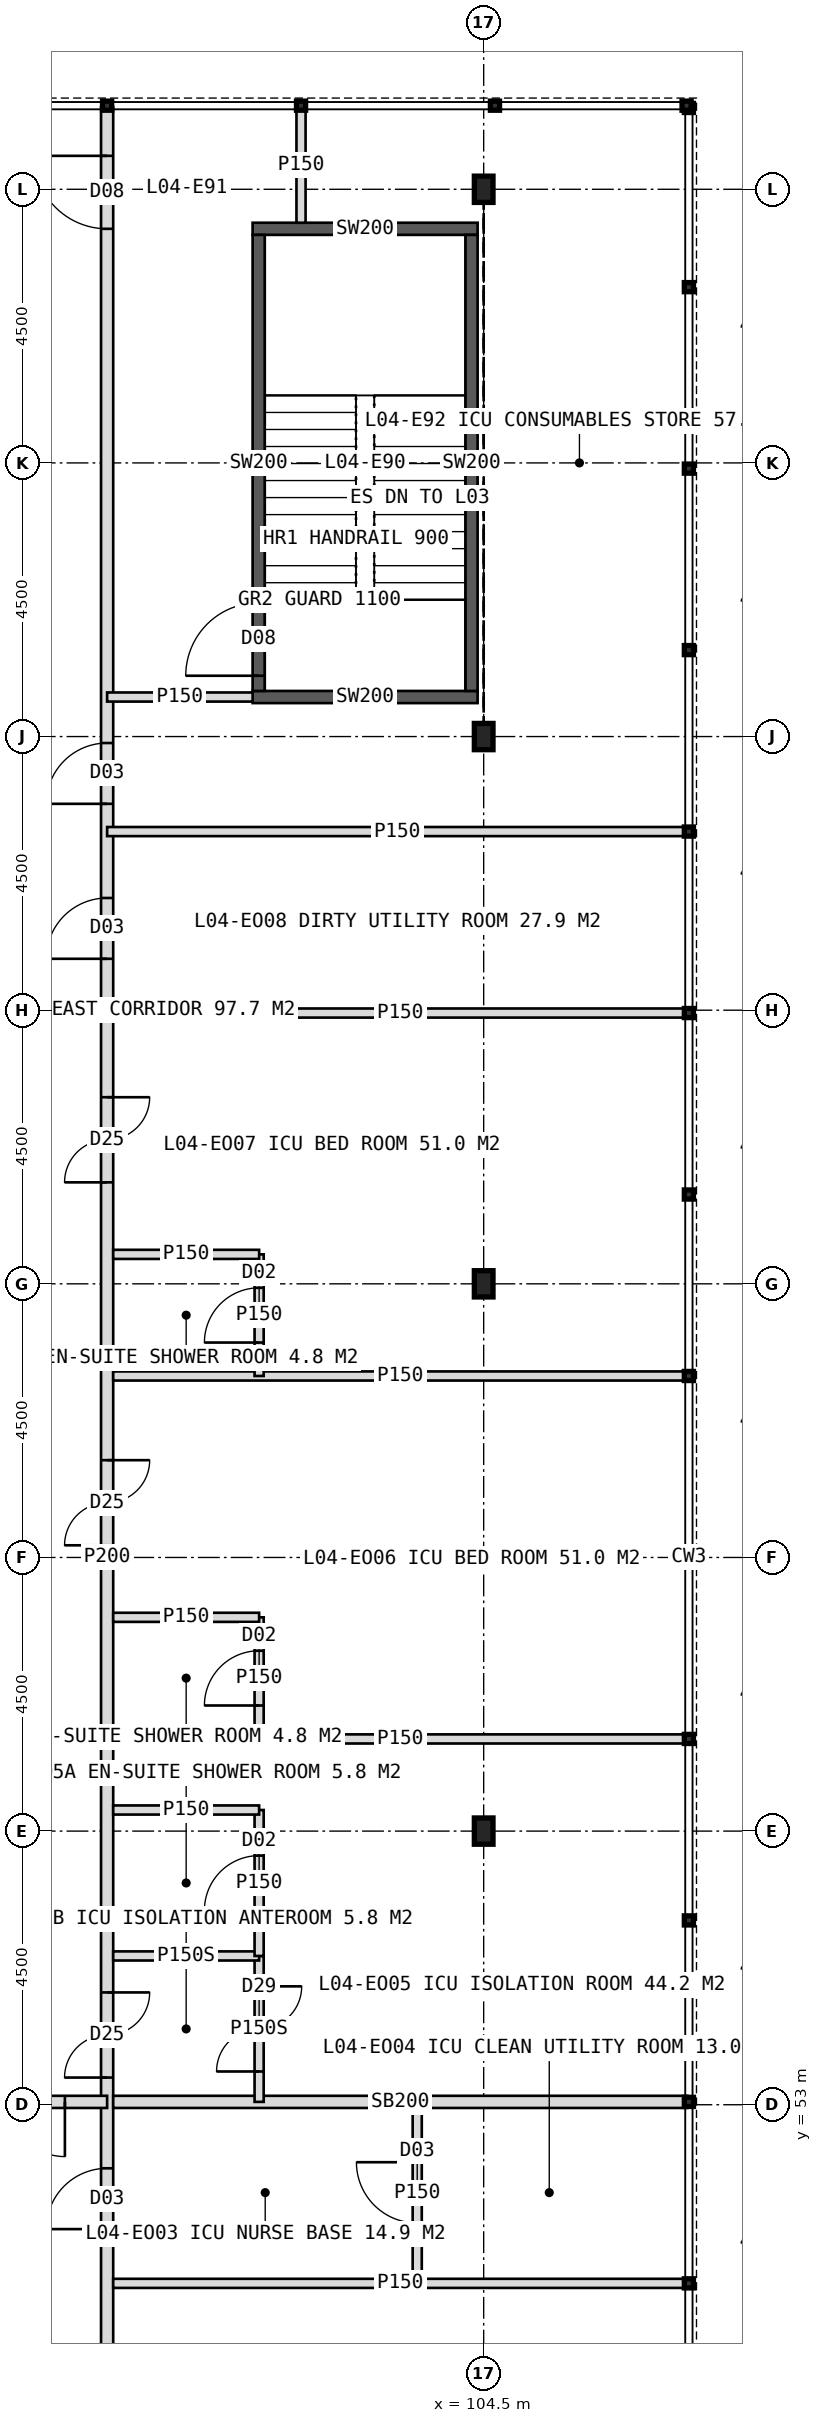
"""IFC4 building model, lengths in metres.
Left out: names, types, materials, properties, quantities, classifications, styles, units other than length and angle.
Written with IfcOpenShell. Run it as: python <this file> out.ifc"""

import sys

from ifc_helpers import new_model, si_unit, direction, frame, frame_2d, origin, origin_2d, place, context, subcontext, project, spatial, rectangle, i_section, extrude, element, fill, save


model = new_model("IFC4")
c1 = context("Model", 3, precision=1e-05, world=origin(), true_north=direction((0.0, 1.0)))
c2 = subcontext(c1, "Body", "Model", "MODEL_VIEW")
j1 = project(units=[si_unit("LENGTHUNIT", "METRE"), si_unit("PLANEANGLEUNIT", "RADIAN")], contexts=[c1])
p1 = place(None, origin())
s1 = spatial("IfcSite", under=j1, at=p1, CompositionType="ELEMENT")
p2 = place(p1, origin())
s2 = spatial("IfcBuilding", under=s1, at=p2, CompositionType="ELEMENT")
p3 = place(p2, frame((0.0, 0.0, 21.0)))
s3 = spatial("IfcBuildingStorey", under=s2, at=p3, CompositionType="ELEMENT", Elevation=21.0)
for number, where, z_axis, x_axis in (
    (1, (104.5, 57.5, 0.0), (0.0, 0.0, 1.0), (1.0, 0.0, 0.0)),
    (2, (104.5, 66.5, 0.0), (0.0, 0.0, 1.0), (1.0, 0.0, 0.0)),
    (3, (104.5, 75.5, 0.0), (0.0, 0.0, 1.0), (1.0, 0.0, 0.0)),
    (4, (104.5, 84.5, 0.0), (0.0, 0.0, 1.0), (1.0, 0.0, 0.0)),
):
    element("IfcColumn", number, at=place(p3, frame(where, z_axis=z_axis, x_axis=x_axis)), inside=s3, PredefinedType="COLUMN", context=c2, shape_type="SweptSolid", body=[
        extrude(i_section(OverallWidth=0.307, OverallDepth=0.432, WebThickness=0.021, FlangeThickness=0.04, FilletRadius=0.027, at=origin_2d()), origin(), (0.0, 0.0, 1.0), 5.0),
    ])
p4 = place(p3, frame((98.307, 38.15, 0.0), z_axis=(0.0, 0.0, 1.0), x_axis=(0.0, 1.0, 0.0)))
e5 = element("IfcWall", 5, at=p4, inside=s3, PredefinedType="PARTITIONING", context=c2, shape_type="SweptSolid", body=[
    extrude(rectangle(XDim=47.7, YDim=0.2, at=frame_2d((23.85, 0.0))), origin(), (0.0, 0.0, 1.0), 4.7),
])
p5 = place(p4, frame((45.7, 0.0, 0.0)))
e6 = element("IfcOpeningElement", 6, at=p5, cuts=e5, PredefinedType="OPENING", context=c2, shape_type="SweptSolid", body=[
    extrude(rectangle(XDim=1.2, YDim=2.1, at=frame_2d((0.6, 1.05))), frame((0.0, 0.11, 0.0), z_axis=(0.0, -1.0, 0.0), x_axis=(1.0, 0.0, 0.0)), (0.0, 0.0, 1.0), 0.22),
])
p6 = place(p4, frame((36.244, 0.0, 0.0)))
e7 = element("IfcOpeningElement", 7, at=p6, cuts=e5, PredefinedType="OPENING", context=c2, shape_type="SweptSolid", body=[
    extrude(rectangle(XDim=1.0, YDim=2.1, at=frame_2d((0.5, 1.05))), frame((0.0, 0.11, 0.0), z_axis=(0.0, -1.0, 0.0), x_axis=(1.0, 0.0, 0.0)), (0.0, 0.0, 1.0), 0.22),
])
p7 = place(p4, frame((15.297, 0.0, 0.0)))
e8 = element("IfcOpeningElement", 8, at=p7, cuts=e5, PredefinedType="OPENING", context=c2, shape_type="SweptSolid", body=[
    extrude(rectangle(XDim=1.4, YDim=2.2, at=frame_2d((0.7, 1.1))), frame((0.0, 0.11, 0.0), z_axis=(0.0, -1.0, 0.0), x_axis=(1.0, 0.0, 0.0)), (0.0, 0.0, 1.0), 0.22),
])
p8 = place(p4, frame((3.222, 0.0, 0.0)))
e9 = element("IfcOpeningElement", 9, at=p8, cuts=e5, PredefinedType="OPENING", context=c2, shape_type="SweptSolid", body=[
    extrude(rectangle(XDim=1.4, YDim=2.2, at=frame_2d((0.7, 1.1))), frame((0.0, 0.11, 0.0), z_axis=(0.0, -1.0, 0.0), x_axis=(1.0, 0.0, 0.0)), (0.0, 0.0, 1.0), 0.22),
])
p9 = place(p4, frame((9.128, 0.0, 0.0)))
e10 = element("IfcOpeningElement", 10, at=p9, cuts=e5, PredefinedType="OPENING", context=c2, shape_type="SweptSolid", body=[
    extrude(rectangle(XDim=1.4, YDim=2.2, at=frame_2d((0.7, 1.1))), frame((0.0, 0.11, 0.0), z_axis=(0.0, -1.0, 0.0), x_axis=(1.0, 0.0, 0.0)), (0.0, 0.0, 1.0), 0.22),
])
p10 = place(p4, frame((12.805, 0.0, 0.0)))
e11 = element("IfcOpeningElement", 11, at=p10, cuts=e5, PredefinedType="OPENING", context=c2, shape_type="SweptSolid", body=[
    extrude(rectangle(XDim=1.0, YDim=2.1, at=frame_2d((0.5, 1.05))), frame((0.0, 0.11, 0.0), z_axis=(0.0, -1.0, 0.0), x_axis=(1.0, 0.0, 0.0)), (0.0, 0.0, 1.0), 0.22),
])
p11 = place(p4, frame((24.05, 0.0, 0.0)))
e12 = element("IfcOpeningElement", 12, at=p11, cuts=e5, PredefinedType="OPENING", context=c2, shape_type="SweptSolid", body=[
    extrude(rectangle(XDim=1.4, YDim=2.2, at=frame_2d((0.7, 1.1))), frame((0.0, 0.11, 0.0), z_axis=(0.0, -1.0, 0.0), x_axis=(1.0, 0.0, 0.0)), (0.0, 0.0, 1.0), 0.22),
])
p12 = place(p4, frame((30.019, 0.0, 0.0)))
e13 = element("IfcOpeningElement", 13, at=p12, cuts=e5, PredefinedType="OPENING", context=c2, shape_type="SweptSolid", body=[
    extrude(rectangle(XDim=1.4, YDim=2.2, at=frame_2d((0.7, 1.1))), frame((0.0, 0.11, 0.0), z_axis=(0.0, -1.0, 0.0), x_axis=(1.0, 0.0, 0.0)), (0.0, 0.0, 1.0), 0.22),
])
p13 = place(p4, frame((33.695, 0.0, 0.0)))
e14 = element("IfcOpeningElement", 14, at=p13, cuts=e5, PredefinedType="OPENING", context=c2, shape_type="SweptSolid", body=[
    extrude(rectangle(XDim=1.0, YDim=2.1, at=frame_2d((0.5, 1.05))), frame((0.0, 0.11, 0.0), z_axis=(0.0, -1.0, 0.0), x_axis=(1.0, 0.0, 0.0)), (0.0, 0.0, 1.0), 0.22),
])
p14 = place(p3, frame((98.307, 53.047, 0.0), z_axis=(0.0, 0.0, 1.0), x_axis=(-1.0, 0.0, 0.0)))
e15 = element("IfcWall", 15, at=p14, inside=s3, PredefinedType="SOLIDWALL", context=c2, shape_type="SweptSolid", body=[
    extrude(rectangle(XDim=3.189, YDim=0.2, at=frame_2d((1.594, 0.0))), origin(), (0.0, 0.0, 1.0), 4.7),
])
p15 = place(p14, frame((0.695, 0.0, 0.0)))
e16 = element("IfcOpeningElement", 16, at=p15, cuts=e15, PredefinedType="OPENING", context=c2, shape_type="SweptSolid", body=[
    extrude(rectangle(XDim=1.8, YDim=2.2, at=frame_2d((0.9, 1.1))), frame((0.0, 0.11, 0.0), z_axis=(0.0, -1.0, 0.0), x_axis=(1.0, 0.0, 0.0)), (0.0, 0.0, 1.0), 0.22),
])
for number, where, z_axis, x_axis in (
    (17, (100.7, 76.15, 0.0), (0.0, 0.0, 1.0), (1.0, 0.0, 0.0)),
    (18, (100.7, 83.85, 0.0), (0.0, 0.0, 1.0), (1.0, 0.0, 0.0)),
):
    element("IfcWall", number, at=place(p3, frame(where, z_axis=z_axis, x_axis=x_axis)), inside=s3, PredefinedType="SOLIDWALL", context=c2, shape_type="SweptSolid", body=[
        extrude(rectangle(XDim=3.7, YDim=0.2, at=frame_2d((1.85, 0.0))), origin(), (0.0, 0.0, 1.0), 4.7),
    ])
p16 = place(p3, frame((100.8, 76.25, 0.0), z_axis=(0.0, 0.0, 1.0), x_axis=(0.0, 1.0, 0.0)))
e19 = element("IfcWall", 19, at=p16, inside=s3, PredefinedType="SOLIDWALL", context=c2, shape_type="SweptSolid", body=[
    extrude(rectangle(XDim=7.5, YDim=0.2, at=frame_2d((3.75, 0.0))), origin(), (0.0, 0.0, 1.0), 4.7),
])
p17 = place(p16, frame((0.25, 0.0, 0.0)))
e20 = element("IfcOpeningElement", 20, at=p17, cuts=e19, PredefinedType="OPENING", context=c2, shape_type="SweptSolid", body=[
    extrude(rectangle(XDim=1.2, YDim=2.1, at=frame_2d((0.6, 1.05))), frame((0.0, 0.11, 0.0), z_axis=(0.0, -1.0, 0.0), x_axis=(1.0, 0.0, 0.0)), (0.0, 0.0, 1.0), 0.22),
])
p18 = place(p3, frame((104.3, 76.25, 0.0), z_axis=(0.0, 0.0, 1.0), x_axis=(0.0, 1.0, 0.0)))
e21 = element("IfcWall", 21, at=p18, inside=s3, PredefinedType="SOLIDWALL", context=c2, shape_type="SweptSolid", body=[
    extrude(rectangle(XDim=7.5, YDim=0.2, at=frame_2d((3.75, 0.0))), origin(), (0.0, 0.0, 1.0), 4.7),
])
p19 = place(p3, frame((100.7, 76.15, 0.0), z_axis=(0.0, 0.0, 1.0), x_axis=(-1.0, 0.0, 0.0)))
e22 = element("IfcWall", 22, at=p19, inside=s3, PredefinedType="PARTITIONING", context=c2, shape_type="SweptSolid", body=[
    extrude(rectangle(XDim=2.393, YDim=0.15, at=frame_2d((1.197, 0.0))), origin(), (0.0, 0.0, 1.0), 4.7),
])
p20 = place(p3, frame((101.496, 83.95, 0.0), z_axis=(0.0, 0.0, 1.0), x_axis=(0.0, 1.0, 0.0)))
e23 = element("IfcWall", 23, at=p20, inside=s3, PredefinedType="PARTITIONING", context=c2, shape_type="SweptSolid", body=[
    extrude(rectangle(XDim=1.9, YDim=0.15, at=frame_2d((0.95, 0.0))), origin(), (0.0, 0.0, 1.0), 4.7),
])
p21 = place(p3, frame((107.85, 73.938, 0.0), z_axis=(0.0, 0.0, 1.0), x_axis=(-1.0, 0.0, 0.0)))
e24 = element("IfcWall", 24, at=p21, inside=s3, PredefinedType="PARTITIONING", context=c2, shape_type="SweptSolid", body=[
    extrude(rectangle(XDim=9.543, YDim=0.15, at=frame_2d((4.771, 0.0))), origin(), (0.0, 0.0, 1.0), 4.7),
])
p22 = place(p3, frame((107.85, 50.062, 0.0), z_axis=(0.0, 0.0, 1.0), x_axis=(-1.0, 0.0, 0.0)))
e25 = element("IfcWall", 25, at=p22, inside=s3, PredefinedType="PARTITIONING", context=c2, shape_type="SweptSolid", body=[
    extrude(rectangle(XDim=9.443, YDim=0.15, at=frame_2d((4.722, 0.0))), origin(), (0.0, 0.0, 1.0), 4.7),
])
p23 = place(p3, frame((107.85, 53.047, 0.0), z_axis=(0.0, 0.0, 1.0), x_axis=(-1.0, 0.0, 0.0)))
e26 = element("IfcWall", 26, at=p23, inside=s3, PredefinedType="SOLIDWALL", context=c2, shape_type="SweptSolid", body=[
    extrude(rectangle(XDim=9.443, YDim=0.2, at=frame_2d((4.722, 0.0))), origin(), (0.0, 0.0, 1.0), 4.7),
])
for number, where, z_axis, x_axis in (
    (27, (107.85, 59.016, 0.0), (0.0, 0.0, 1.0), (-1.0, 0.0, 0.0)),
    (28, (107.85, 64.984, 0.0), (0.0, 0.0, 1.0), (-1.0, 0.0, 0.0)),
    (29, (107.85, 70.953, 0.0), (0.0, 0.0, 1.0), (-1.0, 0.0, 0.0)),
):
    element("IfcWall", number, at=place(p3, frame(where, z_axis=z_axis, x_axis=x_axis)), inside=s3, PredefinedType="PARTITIONING", context=c2, shape_type="SweptSolid", body=[
        extrude(rectangle(XDim=9.443, YDim=0.15, at=frame_2d((4.722, 0.0))), origin(), (0.0, 0.0, 1.0), 4.7),
    ])
p24 = place(p3, frame((103.407, 50.062, 0.0), z_axis=(0.0, 0.0, 1.0), x_axis=(0.0, 1.0, 0.0)))
e30 = element("IfcWall", 30, at=p24, inside=s3, PredefinedType="PARTITIONING", context=c2, shape_type="SweptSolid", body=[
    extrude(rectangle(XDim=2.984, YDim=0.15, at=frame_2d((1.492, 0.0))), origin(), (0.0, 0.0, 1.0), 4.7),
])
p25 = place(p24, frame((0.992, 0.0, 0.0)))
e31 = element("IfcOpeningElement", 31, at=p25, cuts=e30, PredefinedType="OPENING", context=c2, shape_type="SweptSolid", body=[
    extrude(rectangle(XDim=1.0, YDim=2.1, at=frame_2d((0.5, 1.05))), frame((0.0, 0.085, 0.0), z_axis=(0.0, -1.0, 0.0), x_axis=(1.0, 0.0, 0.0)), (0.0, 0.0, 1.0), 0.17),
])
p26 = place(p3, frame((100.807, 53.047, 0.0), z_axis=(0.0, 0.0, 1.0), x_axis=(0.0, 1.0, 0.0)))
e32 = element("IfcWall", 32, at=p26, inside=s3, PredefinedType="PARTITIONING", context=c2, shape_type="SweptSolid", body=[
    extrude(rectangle(XDim=2.4, YDim=0.15, at=frame_2d((1.2, 0.0))), origin(), (0.0, 0.0, 1.0), 4.7),
])
p27 = place(p26, frame((0.5, 0.0, 0.0)))
e33 = element("IfcOpeningElement", 33, at=p27, cuts=e32, PredefinedType="OPENING", context=c2, shape_type="SweptSolid", body=[
    extrude(rectangle(XDim=1.4, YDim=2.2, at=frame_2d((0.7, 1.1))), frame((0.0, 0.085, 0.0), z_axis=(0.0, -1.0, 0.0), x_axis=(1.0, 0.0, 0.0)), (0.0, 0.0, 1.0), 0.17),
])
p28 = place(p3, frame((98.407, 55.447, 0.0), z_axis=(0.0, 0.0, 1.0), x_axis=(1.0, 0.0, 0.0)))
e34 = element("IfcWall", 34, at=p28, inside=s3, PredefinedType="PARTITIONING", context=c2, shape_type="SweptSolid", body=[
    extrude(rectangle(XDim=2.4, YDim=0.15, at=frame_2d((1.2, 0.0))), origin(), (0.0, 0.0, 1.0), 4.7),
])
p29 = place(p3, frame((100.807, 55.447, 0.0), z_axis=(0.0, 0.0, 1.0), x_axis=(0.0, 1.0, 0.0)))
e35 = element("IfcWall", 35, at=p29, inside=s3, PredefinedType="PARTITIONING", context=c2, shape_type="SweptSolid", body=[
    extrude(rectangle(XDim=2.4, YDim=0.15, at=frame_2d((1.2, 0.0))), origin(), (0.0, 0.0, 1.0), 4.7),
])
p30 = place(p29, frame((0.75, 0.0, 0.0)))
e36 = element("IfcOpeningElement", 36, at=p30, cuts=e35, PredefinedType="OPENING", context=c2, shape_type="SweptSolid", body=[
    extrude(rectangle(XDim=0.9, YDim=2.1, at=frame_2d((0.45, 1.05))), frame((0.0, 0.085, 0.0), z_axis=(0.0, -1.0, 0.0), x_axis=(1.0, 0.0, 0.0)), (0.0, 0.0, 1.0), 0.17),
])
p31 = place(p3, frame((98.407, 57.847, 0.0), z_axis=(0.0, 0.0, 1.0), x_axis=(1.0, 0.0, 0.0)))
e37 = element("IfcWall", 37, at=p31, inside=s3, PredefinedType="PARTITIONING", context=c2, shape_type="SweptSolid", body=[
    extrude(rectangle(XDim=2.4, YDim=0.15, at=frame_2d((1.2, 0.0))), origin(), (0.0, 0.0, 1.0), 4.7),
])
p32 = place(p3, frame((100.807, 59.016, 0.0), z_axis=(0.0, 0.0, 1.0), x_axis=(0.0, 1.0, 0.0)))
e38 = element("IfcWall", 38, at=p32, inside=s3, PredefinedType="PARTITIONING", context=c2, shape_type="SweptSolid", body=[
    extrude(rectangle(XDim=2.0, YDim=0.15, at=frame_2d((1.0, 0.0))), origin(), (0.0, 0.0, 1.0), 4.7),
])
p33 = place(p32, frame((0.55, 0.0, 0.0)))
e39 = element("IfcOpeningElement", 39, at=p33, cuts=e38, PredefinedType="OPENING", context=c2, shape_type="SweptSolid", body=[
    extrude(rectangle(XDim=0.9, YDim=2.1, at=frame_2d((0.45, 1.05))), frame((0.0, 0.085, 0.0), z_axis=(0.0, -1.0, 0.0), x_axis=(1.0, 0.0, 0.0)), (0.0, 0.0, 1.0), 0.17),
])
p34 = place(p3, frame((98.407, 61.016, 0.0), z_axis=(0.0, 0.0, 1.0), x_axis=(1.0, 0.0, 0.0)))
e40 = element("IfcWall", 40, at=p34, inside=s3, PredefinedType="PARTITIONING", context=c2, shape_type="SweptSolid", body=[
    extrude(rectangle(XDim=2.4, YDim=0.15, at=frame_2d((1.2, 0.0))), origin(), (0.0, 0.0, 1.0), 4.7),
])
p35 = place(p3, frame((100.807, 64.984, 0.0), z_axis=(0.0, 0.0, 1.0), x_axis=(0.0, 1.0, 0.0)))
e41 = element("IfcWall", 41, at=p35, inside=s3, PredefinedType="PARTITIONING", context=c2, shape_type="SweptSolid", body=[
    extrude(rectangle(XDim=2.0, YDim=0.15, at=frame_2d((1.0, 0.0))), origin(), (0.0, 0.0, 1.0), 4.7),
])
p36 = place(p35, frame((0.55, 0.0, 0.0)))
e42 = element("IfcOpeningElement", 42, at=p36, cuts=e41, PredefinedType="OPENING", context=c2, shape_type="SweptSolid", body=[
    extrude(rectangle(XDim=0.9, YDim=2.1, at=frame_2d((0.45, 1.05))), frame((0.0, 0.085, 0.0), z_axis=(0.0, -1.0, 0.0), x_axis=(1.0, 0.0, 0.0)), (0.0, 0.0, 1.0), 0.17),
])
p37 = place(p3, frame((98.407, 66.984, 0.0), z_axis=(0.0, 0.0, 1.0), x_axis=(1.0, 0.0, 0.0)))
e43 = element("IfcWall", 43, at=p37, inside=s3, PredefinedType="PARTITIONING", context=c2, shape_type="SweptSolid", body=[
    extrude(rectangle(XDim=2.4, YDim=0.15, at=frame_2d((1.2, 0.0))), origin(), (0.0, 0.0, 1.0), 4.7),
])
p38 = place(p15, origin())
e44 = element("IfcDoor", 44, at=p38, inside=s3, OperationType="DOUBLE_DOOR_DOUBLE_SWING", PredefinedType="DOOR", context=c2, shape_type="SweptSolid", body=[
    extrude(rectangle(XDim=1.8, YDim=2.2, at=frame_2d((0.9, 1.1))), frame((0.0, 0.025, 0.0), z_axis=(0.0, -1.0, 0.0), x_axis=(1.0, 0.0, 0.0)), (0.0, 0.0, 1.0), 0.05),
])
fill(e16, e44)
p39 = place(p17, origin())
e45 = element("IfcDoor", 45, at=p39, inside=s3, OperationType="SINGLE_SWING_LEFT", PredefinedType="DOOR", context=c2, shape_type="SweptSolid", body=[
    extrude(rectangle(XDim=1.2, YDim=2.1, at=frame_2d((0.6, 1.05))), frame((0.0, 0.025, 0.0), z_axis=(0.0, -1.0, 0.0), x_axis=(1.0, 0.0, 0.0)), (0.0, 0.0, 1.0), 0.05),
])
fill(e20, e45)
p40 = place(p5, origin())
e46 = element("IfcDoor", 46, at=p40, inside=s3, OperationType="SINGLE_SWING_RIGHT", PredefinedType="DOOR", context=c2, shape_type="SweptSolid", body=[
    extrude(rectangle(XDim=1.2, YDim=2.1, at=frame_2d((0.6, 1.05))), frame((0.0, 0.025, 0.0), z_axis=(0.0, -1.0, 0.0), x_axis=(1.0, 0.0, 0.0)), (0.0, 0.0, 1.0), 0.05),
])
fill(e6, e46)
p41 = place(p6, origin())
e47 = element("IfcDoor", 47, at=p41, inside=s3, OperationType="SINGLE_SWING_LEFT", PredefinedType="DOOR", context=c2, shape_type="SweptSolid", body=[
    extrude(rectangle(XDim=1.0, YDim=2.1, at=frame_2d((0.5, 1.05))), frame((0.0, 0.025, 0.0), z_axis=(0.0, -1.0, 0.0), x_axis=(1.0, 0.0, 0.0)), (0.0, 0.0, 1.0), 0.05),
])
fill(e7, e47)
p42 = place(p27, origin())
e48 = element("IfcDoor", 48, at=p42, inside=s3, OperationType="DOUBLE_DOOR_SINGLE_SWING", PredefinedType="DOOR", context=c2, shape_type="SweptSolid", body=[
    extrude(rectangle(XDim=1.4, YDim=2.2, at=frame_2d((0.7, 1.1))), frame((0.0, 0.025, 0.0), z_axis=(0.0, -1.0, 0.0), x_axis=(1.0, 0.0, 0.0)), (0.0, 0.0, 1.0), 0.05),
])
fill(e33, e48)
p43 = place(p7, origin())
e49 = element("IfcDoor", 49, at=p43, inside=s3, OperationType="DOUBLE_DOOR_SINGLE_SWING", PredefinedType="DOOR", context=c2, shape_type="SweptSolid", body=[
    extrude(rectangle(XDim=1.4, YDim=2.2, at=frame_2d((0.7, 1.1))), frame((0.0, 0.025, 0.0), z_axis=(0.0, -1.0, 0.0), x_axis=(1.0, 0.0, 0.0)), (0.0, 0.0, 1.0), 0.05),
])
fill(e8, e49)
p44 = place(p30, origin())
e50 = element("IfcDoor", 50, at=p44, inside=s3, OperationType="SINGLE_SWING_LEFT", PredefinedType="DOOR", context=c2, shape_type="SweptSolid", body=[
    extrude(rectangle(XDim=0.9, YDim=2.1, at=frame_2d((0.45, 1.05))), frame((0.0, 0.025, 0.0), z_axis=(0.0, -1.0, 0.0), x_axis=(1.0, 0.0, 0.0)), (0.0, 0.0, 1.0), 0.05),
])
fill(e36, e50)
p45 = place(p33, origin())
e51 = element("IfcDoor", 51, at=p45, inside=s3, OperationType="SINGLE_SWING_LEFT", PredefinedType="DOOR", context=c2, shape_type="SweptSolid", body=[
    extrude(rectangle(XDim=0.9, YDim=2.1, at=frame_2d((0.45, 1.05))), frame((0.0, 0.025, 0.0), z_axis=(0.0, -1.0, 0.0), x_axis=(1.0, 0.0, 0.0)), (0.0, 0.0, 1.0), 0.05),
])
fill(e39, e51)
p46 = place(p36, origin())
e52 = element("IfcDoor", 52, at=p46, inside=s3, OperationType="SINGLE_SWING_LEFT", PredefinedType="DOOR", context=c2, shape_type="SweptSolid", body=[
    extrude(rectangle(XDim=0.9, YDim=2.1, at=frame_2d((0.45, 1.05))), frame((0.0, 0.025, 0.0), z_axis=(0.0, -1.0, 0.0), x_axis=(1.0, 0.0, 0.0)), (0.0, 0.0, 1.0), 0.05),
])
fill(e42, e52)
p47 = place(p10, origin())
e53 = element("IfcDoor", 53, at=p47, inside=s3, OperationType="SINGLE_SWING_LEFT", PredefinedType="DOOR", context=c2, shape_type="SweptSolid", body=[
    extrude(rectangle(XDim=1.0, YDim=2.1, at=frame_2d((0.5, 1.05))), frame((0.0, 0.025, 0.0), z_axis=(0.0, -1.0, 0.0), x_axis=(1.0, 0.0, 0.0)), (0.0, 0.0, 1.0), 0.05),
])
fill(e11, e53)
p48 = place(p25, origin())
e54 = element("IfcDoor", 54, at=p48, inside=s3, OperationType="SINGLE_SWING_RIGHT", PredefinedType="DOOR", context=c2, shape_type="SweptSolid", body=[
    extrude(rectangle(XDim=1.0, YDim=2.1, at=frame_2d((0.5, 1.05))), frame((0.0, 0.025, 0.0), z_axis=(0.0, -1.0, 0.0), x_axis=(1.0, 0.0, 0.0)), (0.0, 0.0, 1.0), 0.05),
])
fill(e31, e54)
p49 = place(p11, origin())
e55 = element("IfcDoor", 55, at=p49, inside=s3, OperationType="DOUBLE_DOOR_SINGLE_SWING", PredefinedType="DOOR", context=c2, shape_type="SweptSolid", body=[
    extrude(rectangle(XDim=1.4, YDim=2.2, at=frame_2d((0.7, 1.1))), frame((0.0, 0.025, 0.0), z_axis=(0.0, -1.0, 0.0), x_axis=(1.0, 0.0, 0.0)), (0.0, 0.0, 1.0), 0.05),
])
fill(e12, e55)
p50 = place(p12, origin())
e56 = element("IfcDoor", 56, at=p50, inside=s3, OperationType="DOUBLE_DOOR_SINGLE_SWING", PredefinedType="DOOR", context=c2, shape_type="SweptSolid", body=[
    extrude(rectangle(XDim=1.4, YDim=2.2, at=frame_2d((0.7, 1.1))), frame((0.0, 0.025, 0.0), z_axis=(0.0, -1.0, 0.0), x_axis=(1.0, 0.0, 0.0)), (0.0, 0.0, 1.0), 0.05),
])
fill(e13, e56)
p51 = place(p13, origin())
e57 = element("IfcDoor", 57, at=p51, inside=s3, OperationType="SINGLE_SWING_LEFT", PredefinedType="DOOR", context=c2, shape_type="SweptSolid", body=[
    extrude(rectangle(XDim=1.0, YDim=2.1, at=frame_2d((0.5, 1.05))), frame((0.0, 0.025, 0.0), z_axis=(0.0, -1.0, 0.0), x_axis=(1.0, 0.0, 0.0)), (0.0, 0.0, 1.0), 0.05),
])
fill(e14, e57)
save(model, sys.argv[1])
